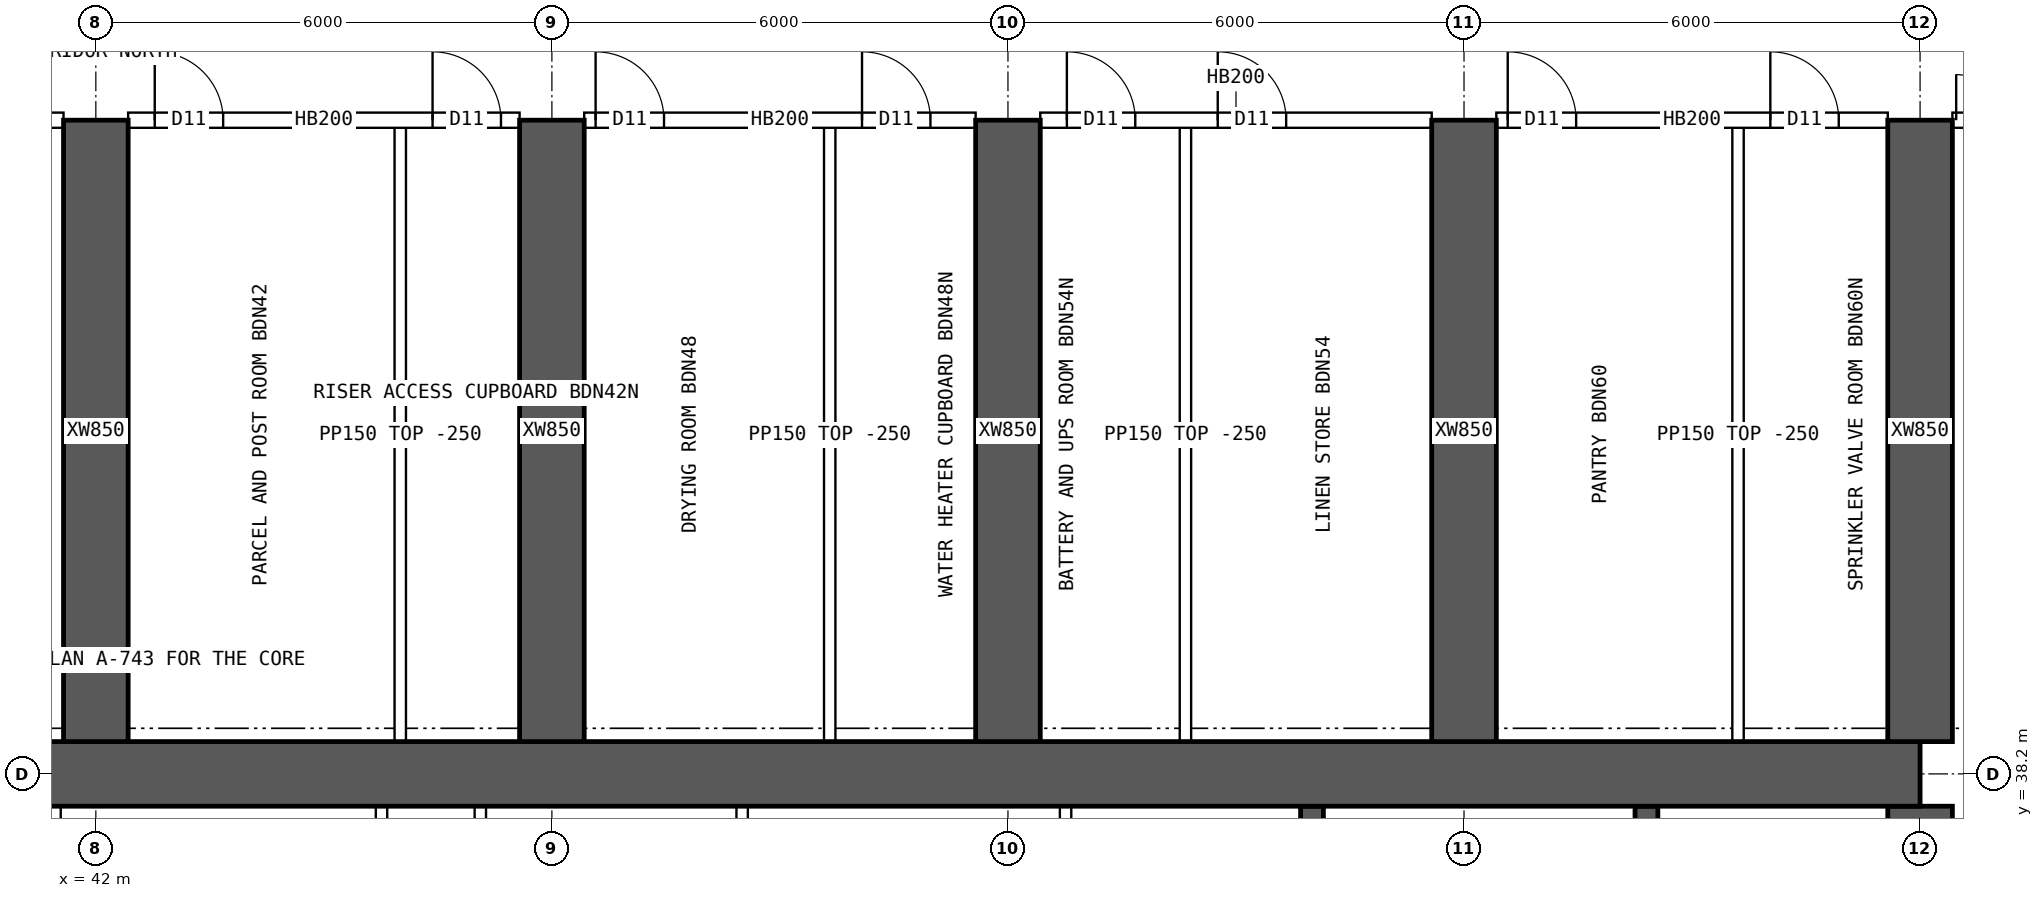
"""IFC4 building model, lengths in metres.
Left out: names, types, materials, properties, quantities, classifications, styles, units other than length and angle.
Written with IfcOpenShell. Run it as: python <this file> out.ifc"""

import sys

from ifc_helpers import new_model, si_unit, direction, frame, frame_2d, origin, place, context, subcontext, project, spatial, rectangle, extrude, element, fill, save


model = new_model("IFC4")
c1 = context("Model", 3, precision=1e-05, world=origin(), true_north=direction((0.0, 1.0)))
c2 = subcontext(c1, "Body", "Model", "MODEL_VIEW")
j1 = project(units=[si_unit("LENGTHUNIT", "METRE"), si_unit("PLANEANGLEUNIT", "RADIAN")], contexts=[c1])
p1 = place(None, origin())
s1 = spatial("IfcSite", under=j1, at=p1, CompositionType="ELEMENT")
p2 = place(p1, origin())
s2 = spatial("IfcBuilding", under=s1, at=p2, CompositionType="ELEMENT")
p3 = place(p2, frame((0.0, 0.0, 163.6)))
s3 = spatial("IfcBuildingStorey", under=s2, at=p3, CompositionType="ELEMENT", Elevation=163.6)
p4 = place(p3, frame((18.0, 38.2, 0.0), z_axis=(0.0, 0.0, 1.0), x_axis=(1.0, 0.0, 0.0)))
e1 = element("IfcWall", 1, at=p4, inside=s3, PredefinedType="SHEAR", context=c2, shape_type="SweptSolid", body=[
    extrude(rectangle(XDim=48.0, YDim=0.85, at=frame_2d((24.0, 0.0))), origin(), (0.0, 0.0, 1.0), 3.75),
])
p5 = place(p3, frame((66.0, 26.225, 0.0), z_axis=(0.0, 0.0, 1.0), x_axis=(0.0, 1.0, 0.0)))
e2 = element("IfcWall", 2, at=p5, inside=s3, PredefinedType="SHEAR", context=c2, shape_type="SweptSolid", body=[
    extrude(rectangle(XDim=11.55, YDim=0.85, at=frame_2d((5.775, 0.0))), origin(), (0.0, 0.0, 1.0), 3.75),
])
p6 = place(p5, frame((5.075, 0.0, 0.0)))
e3 = element("IfcOpeningElement", 3, at=p6, cuts=e2, PredefinedType="OPENING", context=c2, shape_type="SweptSolid", body=[
    extrude(rectangle(XDim=1.2, YDim=2.1, at=frame_2d((0.6, 1.05))), frame((0.0, 0.435, 0.0), z_axis=(0.0, -1.0, 0.0), x_axis=(1.0, 0.0, 0.0)), (0.0, 0.0, 1.0), 0.87),
])
for number, where, z_axis, x_axis in (
    (4, (62.4, 34.75, 0.0), (0.0, 0.0, 1.0), (0.0, 1.0, 0.0)),
    (5, (58.0, 34.75, 0.0), (0.0, 0.0, 1.0), (0.0, 1.0, 0.0)),
):
    element("IfcWall", number, at=place(p3, frame(where, z_axis=z_axis, x_axis=x_axis)), inside=s3, PredefinedType="SHEAR", context=c2, shape_type="SweptSolid", body=[
        extrude(rectangle(XDim=3.025, YDim=0.3, at=frame_2d((1.512, 0.0))), origin(), (0.0, 0.0, 1.0), 3.75),
    ])
for number, where, z_axis, x_axis in (
    (6, (42.0, 38.625, 0.0), (0.0, 0.0, 1.0), (0.0, 1.0, 0.0)),
    (7, (48.0, 38.625, 0.0), (0.0, 0.0, 1.0), (0.0, 1.0, 0.0)),
    (8, (54.0, 38.625, 0.0), (0.0, 0.0, 1.0), (0.0, 1.0, 0.0)),
    (9, (60.0, 38.625, 0.0), (0.0, 0.0, 1.0), (0.0, 1.0, 0.0)),
    (10, (66.0, 38.625, 0.0), (0.0, 0.0, 1.0), (0.0, 1.0, 0.0)),
):
    element("IfcWall", number, at=place(p3, frame(where, z_axis=z_axis, x_axis=x_axis)), inside=s3, PredefinedType="SHEAR", context=c2, shape_type="SweptSolid", body=[
        extrude(rectangle(XDim=8.175, YDim=0.85, at=frame_2d((4.087, 0.0))), origin(), (0.0, 0.0, 1.0), 3.75),
    ])
for number, where, z_axis, x_axis in (
    (11, (41.463, 34.75, 0.0), (0.0, 0.0, 1.0), (0.0, 1.0, 0.0)),
    (12, (45.758, 34.75, 0.0), (0.0, 0.0, 1.0), (0.0, 1.0, 0.0)),
    (13, (47.058, 34.75, 0.0), (0.0, 0.0, 1.0), (0.0, 1.0, 0.0)),
    (14, (50.503, 34.75, 0.0), (0.0, 0.0, 1.0), (0.0, 1.0, 0.0)),
    (15, (54.758, 34.75, 0.0), (0.0, 0.0, 1.0), (0.0, 1.0, 0.0)),
):
    element("IfcWall", number, at=place(p3, frame(where, z_axis=z_axis, x_axis=x_axis)), inside=s3, PredefinedType="SOLIDWALL", context=c2, shape_type="SweptSolid", body=[
        extrude(rectangle(XDim=3.025, YDim=0.15, at=frame_2d((1.512, 0.0))), origin(), (0.0, 0.0, 1.0), 3.5),
    ])
p7 = place(p3, frame((36.425, 46.8, 0.0), z_axis=(0.0, 0.0, 1.0), x_axis=(1.0, 0.0, 0.0)))
e16 = element("IfcWall", 16, at=p7, inside=s3, PredefinedType="SOLIDWALL", context=c2, shape_type="SweptSolid", body=[
    extrude(rectangle(XDim=5.15, YDim=0.2, at=frame_2d((2.575, 0.0))), origin(), (0.0, 0.0, 1.0), 3.5),
])
p8 = place(p7, frame((0.45, 0.0, 0.0)))
e17 = element("IfcOpeningElement", 17, at=p8, cuts=e16, PredefinedType="OPENING", context=c2, shape_type="SweptSolid", body=[
    extrude(rectangle(XDim=1.0, YDim=2.1, at=frame_2d((0.5, 1.05))), frame((0.0, 0.11, 0.0), z_axis=(0.0, -1.0, 0.0), x_axis=(1.0, 0.0, 0.0)), (0.0, 0.0, 1.0), 0.22),
])
p9 = place(p3, frame((42.425, 46.8, 0.0), z_axis=(0.0, 0.0, 1.0), x_axis=(1.0, 0.0, 0.0)))
e18 = element("IfcWall", 18, at=p9, inside=s3, PredefinedType="SOLIDWALL", context=c2, shape_type="SweptSolid", body=[
    extrude(rectangle(XDim=5.15, YDim=0.2, at=frame_2d((2.575, 0.0))), origin(), (0.0, 0.0, 1.0), 3.5),
])
p10 = place(p9, frame((0.35, 0.0, 0.0)))
e19 = element("IfcOpeningElement", 19, at=p10, cuts=e18, PredefinedType="OPENING", context=c2, shape_type="SweptSolid", body=[
    extrude(rectangle(XDim=0.9, YDim=2.1, at=frame_2d((0.45, 1.05))), frame((0.0, 0.11, 0.0), z_axis=(0.0, -1.0, 0.0), x_axis=(1.0, 0.0, 0.0)), (0.0, 0.0, 1.0), 0.22),
])
p11 = place(p9, frame((4.005, 0.0, 0.0)))
e20 = element("IfcOpeningElement", 20, at=p11, cuts=e18, PredefinedType="OPENING", context=c2, shape_type="SweptSolid", body=[
    extrude(rectangle(XDim=0.9, YDim=2.1, at=frame_2d((0.45, 1.05))), frame((0.0, 0.11, 0.0), z_axis=(0.0, -1.0, 0.0), x_axis=(1.0, 0.0, 0.0)), (0.0, 0.0, 1.0), 0.22),
])
p12 = place(p3, frame((48.425, 46.8, 0.0), z_axis=(0.0, 0.0, 1.0), x_axis=(1.0, 0.0, 0.0)))
e21 = element("IfcWall", 21, at=p12, inside=s3, PredefinedType="SOLIDWALL", context=c2, shape_type="SweptSolid", body=[
    extrude(rectangle(XDim=5.15, YDim=0.2, at=frame_2d((2.575, 0.0))), origin(), (0.0, 0.0, 1.0), 3.5),
])
p13 = place(p12, frame((0.15, 0.0, 0.0)))
e22 = element("IfcOpeningElement", 22, at=p13, cuts=e21, PredefinedType="OPENING", context=c2, shape_type="SweptSolid", body=[
    extrude(rectangle(XDim=0.9, YDim=2.1, at=frame_2d((0.45, 1.05))), frame((0.0, 0.11, 0.0), z_axis=(0.0, -1.0, 0.0), x_axis=(1.0, 0.0, 0.0)), (0.0, 0.0, 1.0), 0.22),
])
p14 = place(p12, frame((3.655, 0.0, 0.0)))
e23 = element("IfcOpeningElement", 23, at=p14, cuts=e21, PredefinedType="OPENING", context=c2, shape_type="SweptSolid", body=[
    extrude(rectangle(XDim=0.9, YDim=2.1, at=frame_2d((0.45, 1.05))), frame((0.0, 0.11, 0.0), z_axis=(0.0, -1.0, 0.0), x_axis=(1.0, 0.0, 0.0)), (0.0, 0.0, 1.0), 0.22),
])
p15 = place(p3, frame((54.425, 46.8, 0.0), z_axis=(0.0, 0.0, 1.0), x_axis=(1.0, 0.0, 0.0)))
e24 = element("IfcWall", 24, at=p15, inside=s3, PredefinedType="SOLIDWALL", context=c2, shape_type="SweptSolid", body=[
    extrude(rectangle(XDim=5.15, YDim=0.2, at=frame_2d((2.575, 0.0))), origin(), (0.0, 0.0, 1.0), 3.5),
])
p16 = place(p15, frame((0.35, 0.0, 0.0)))
e25 = element("IfcOpeningElement", 25, at=p16, cuts=e24, PredefinedType="OPENING", context=c2, shape_type="SweptSolid", body=[
    extrude(rectangle(XDim=0.9, YDim=2.1, at=frame_2d((0.45, 1.05))), frame((0.0, 0.11, 0.0), z_axis=(0.0, -1.0, 0.0), x_axis=(1.0, 0.0, 0.0)), (0.0, 0.0, 1.0), 0.22),
])
p17 = place(p15, frame((2.335, 0.0, 0.0)))
e26 = element("IfcOpeningElement", 26, at=p17, cuts=e24, PredefinedType="OPENING", context=c2, shape_type="SweptSolid", body=[
    extrude(rectangle(XDim=0.9, YDim=2.1, at=frame_2d((0.45, 1.05))), frame((0.0, 0.11, 0.0), z_axis=(0.0, -1.0, 0.0), x_axis=(1.0, 0.0, 0.0)), (0.0, 0.0, 1.0), 0.22),
])
p18 = place(p3, frame((60.425, 46.8, 0.0), z_axis=(0.0, 0.0, 1.0), x_axis=(1.0, 0.0, 0.0)))
e27 = element("IfcWall", 27, at=p18, inside=s3, PredefinedType="SOLIDWALL", context=c2, shape_type="SweptSolid", body=[
    extrude(rectangle(XDim=5.15, YDim=0.2, at=frame_2d((2.575, 0.0))), origin(), (0.0, 0.0, 1.0), 3.5),
])
p19 = place(p18, frame((0.15, 0.0, 0.0)))
e28 = element("IfcOpeningElement", 28, at=p19, cuts=e27, PredefinedType="OPENING", context=c2, shape_type="SweptSolid", body=[
    extrude(rectangle(XDim=0.9, YDim=2.1, at=frame_2d((0.45, 1.05))), frame((0.0, 0.11, 0.0), z_axis=(0.0, -1.0, 0.0), x_axis=(1.0, 0.0, 0.0)), (0.0, 0.0, 1.0), 0.22),
])
p20 = place(p18, frame((3.605, 0.0, 0.0)))
e29 = element("IfcOpeningElement", 29, at=p20, cuts=e27, PredefinedType="OPENING", context=c2, shape_type="SweptSolid", body=[
    extrude(rectangle(XDim=0.9, YDim=2.1, at=frame_2d((0.45, 1.05))), frame((0.0, 0.11, 0.0), z_axis=(0.0, -1.0, 0.0), x_axis=(1.0, 0.0, 0.0)), (0.0, 0.0, 1.0), 0.22),
])
p21 = place(p3, frame((66.425, 46.8, 0.0), z_axis=(0.0, 0.0, 1.0), x_axis=(1.0, 0.0, 0.0)))
e30 = element("IfcWall", 30, at=p21, inside=s3, PredefinedType="SOLIDWALL", context=c2, shape_type="SweptSolid", body=[
    extrude(rectangle(XDim=1.975, YDim=0.2, at=frame_2d((0.987, 0.0))), origin(), (0.0, 0.0, 1.0), 3.5),
])
p22 = place(p21, frame((0.05, 0.0, 0.0)))
e31 = element("IfcOpeningElement", 31, at=p22, cuts=e30, PredefinedType="OPENING", context=c2, shape_type="SweptSolid", body=[
    extrude(rectangle(XDim=1.2, YDim=2.1, at=frame_2d((0.6, 1.05))), frame((0.0, 0.11, 0.0), z_axis=(0.0, -1.0, 0.0), x_axis=(1.0, 0.0, 0.0)), (0.0, 0.0, 1.0), 0.22),
])
for number, where, z_axis, x_axis in (
    (32, (46.005, 38.625, 0.0), (0.0, 0.0, 1.0), (0.0, 1.0, 0.0)),
    (33, (51.655, 38.625, 0.0), (0.0, 0.0, 1.0), (0.0, 1.0, 0.0)),
    (34, (56.335, 38.625, 0.0), (0.0, 0.0, 1.0), (0.0, 1.0, 0.0)),
    (35, (63.605, 38.625, 0.0), (0.0, 0.0, 1.0), (0.0, 1.0, 0.0)),
):
    element("IfcWall", number, at=place(p3, frame(where, z_axis=z_axis, x_axis=x_axis)), inside=s3, PredefinedType="PARTITIONING", context=c2, shape_type="SweptSolid", body=[
        extrude(rectangle(XDim=8.075, YDim=0.15, at=frame_2d((4.038, 0.0))), origin(), (0.0, 0.0, 1.0), 3.5),
    ])
p23 = place(p22, origin())
e36 = element("IfcDoor", 36, at=p23, inside=s3, OperationType="DOUBLE_DOOR_SINGLE_SWING", PredefinedType="DOOR", context=c2, shape_type="SweptSolid", body=[
    extrude(rectangle(XDim=1.2, YDim=2.1, at=frame_2d((0.6, 1.05))), frame((0.0, 0.025, 0.0), z_axis=(0.0, -1.0, 0.0), x_axis=(1.0, 0.0, 0.0)), (0.0, 0.0, 1.0), 0.05),
])
fill(e31, e36)
p24 = place(p10, origin())
e37 = element("IfcDoor", 37, at=p24, inside=s3, OperationType="SINGLE_SWING_LEFT", PredefinedType="DOOR", context=c2, shape_type="SweptSolid", body=[
    extrude(rectangle(XDim=0.9, YDim=2.1, at=frame_2d((0.45, 1.05))), frame((0.0, 0.025, 0.0), z_axis=(0.0, -1.0, 0.0), x_axis=(1.0, 0.0, 0.0)), (0.0, 0.0, 1.0), 0.05),
])
fill(e19, e37)
p25 = place(p11, origin())
e38 = element("IfcDoor", 38, at=p25, inside=s3, OperationType="SINGLE_SWING_LEFT", PredefinedType="DOOR", context=c2, shape_type="SweptSolid", body=[
    extrude(rectangle(XDim=0.9, YDim=2.1, at=frame_2d((0.45, 1.05))), frame((0.0, 0.025, 0.0), z_axis=(0.0, -1.0, 0.0), x_axis=(1.0, 0.0, 0.0)), (0.0, 0.0, 1.0), 0.05),
])
fill(e20, e38)
p26 = place(p13, origin())
e39 = element("IfcDoor", 39, at=p26, inside=s3, OperationType="SINGLE_SWING_LEFT", PredefinedType="DOOR", context=c2, shape_type="SweptSolid", body=[
    extrude(rectangle(XDim=0.9, YDim=2.1, at=frame_2d((0.45, 1.05))), frame((0.0, 0.025, 0.0), z_axis=(0.0, -1.0, 0.0), x_axis=(1.0, 0.0, 0.0)), (0.0, 0.0, 1.0), 0.05),
])
fill(e22, e39)
p27 = place(p14, origin())
e40 = element("IfcDoor", 40, at=p27, inside=s3, OperationType="SINGLE_SWING_LEFT", PredefinedType="DOOR", context=c2, shape_type="SweptSolid", body=[
    extrude(rectangle(XDim=0.9, YDim=2.1, at=frame_2d((0.45, 1.05))), frame((0.0, 0.025, 0.0), z_axis=(0.0, -1.0, 0.0), x_axis=(1.0, 0.0, 0.0)), (0.0, 0.0, 1.0), 0.05),
])
fill(e23, e40)
p28 = place(p16, origin())
e41 = element("IfcDoor", 41, at=p28, inside=s3, OperationType="SINGLE_SWING_LEFT", PredefinedType="DOOR", context=c2, shape_type="SweptSolid", body=[
    extrude(rectangle(XDim=0.9, YDim=2.1, at=frame_2d((0.45, 1.05))), frame((0.0, 0.025, 0.0), z_axis=(0.0, -1.0, 0.0), x_axis=(1.0, 0.0, 0.0)), (0.0, 0.0, 1.0), 0.05),
])
fill(e25, e41)
p29 = place(p17, origin())
e42 = element("IfcDoor", 42, at=p29, inside=s3, OperationType="SINGLE_SWING_LEFT", PredefinedType="DOOR", context=c2, shape_type="SweptSolid", body=[
    extrude(rectangle(XDim=0.9, YDim=2.1, at=frame_2d((0.45, 1.05))), frame((0.0, 0.025, 0.0), z_axis=(0.0, -1.0, 0.0), x_axis=(1.0, 0.0, 0.0)), (0.0, 0.0, 1.0), 0.05),
])
fill(e26, e42)
p30 = place(p19, origin())
e43 = element("IfcDoor", 43, at=p30, inside=s3, OperationType="SINGLE_SWING_LEFT", PredefinedType="DOOR", context=c2, shape_type="SweptSolid", body=[
    extrude(rectangle(XDim=0.9, YDim=2.1, at=frame_2d((0.45, 1.05))), frame((0.0, 0.025, 0.0), z_axis=(0.0, -1.0, 0.0), x_axis=(1.0, 0.0, 0.0)), (0.0, 0.0, 1.0), 0.05),
])
fill(e28, e43)
p31 = place(p20, origin())
e44 = element("IfcDoor", 44, at=p31, inside=s3, OperationType="SINGLE_SWING_LEFT", PredefinedType="DOOR", context=c2, shape_type="SweptSolid", body=[
    extrude(rectangle(XDim=0.9, YDim=2.1, at=frame_2d((0.45, 1.05))), frame((0.0, 0.025, 0.0), z_axis=(0.0, -1.0, 0.0), x_axis=(1.0, 0.0, 0.0)), (0.0, 0.0, 1.0), 0.05),
])
fill(e29, e44)
save(model, sys.argv[1])
